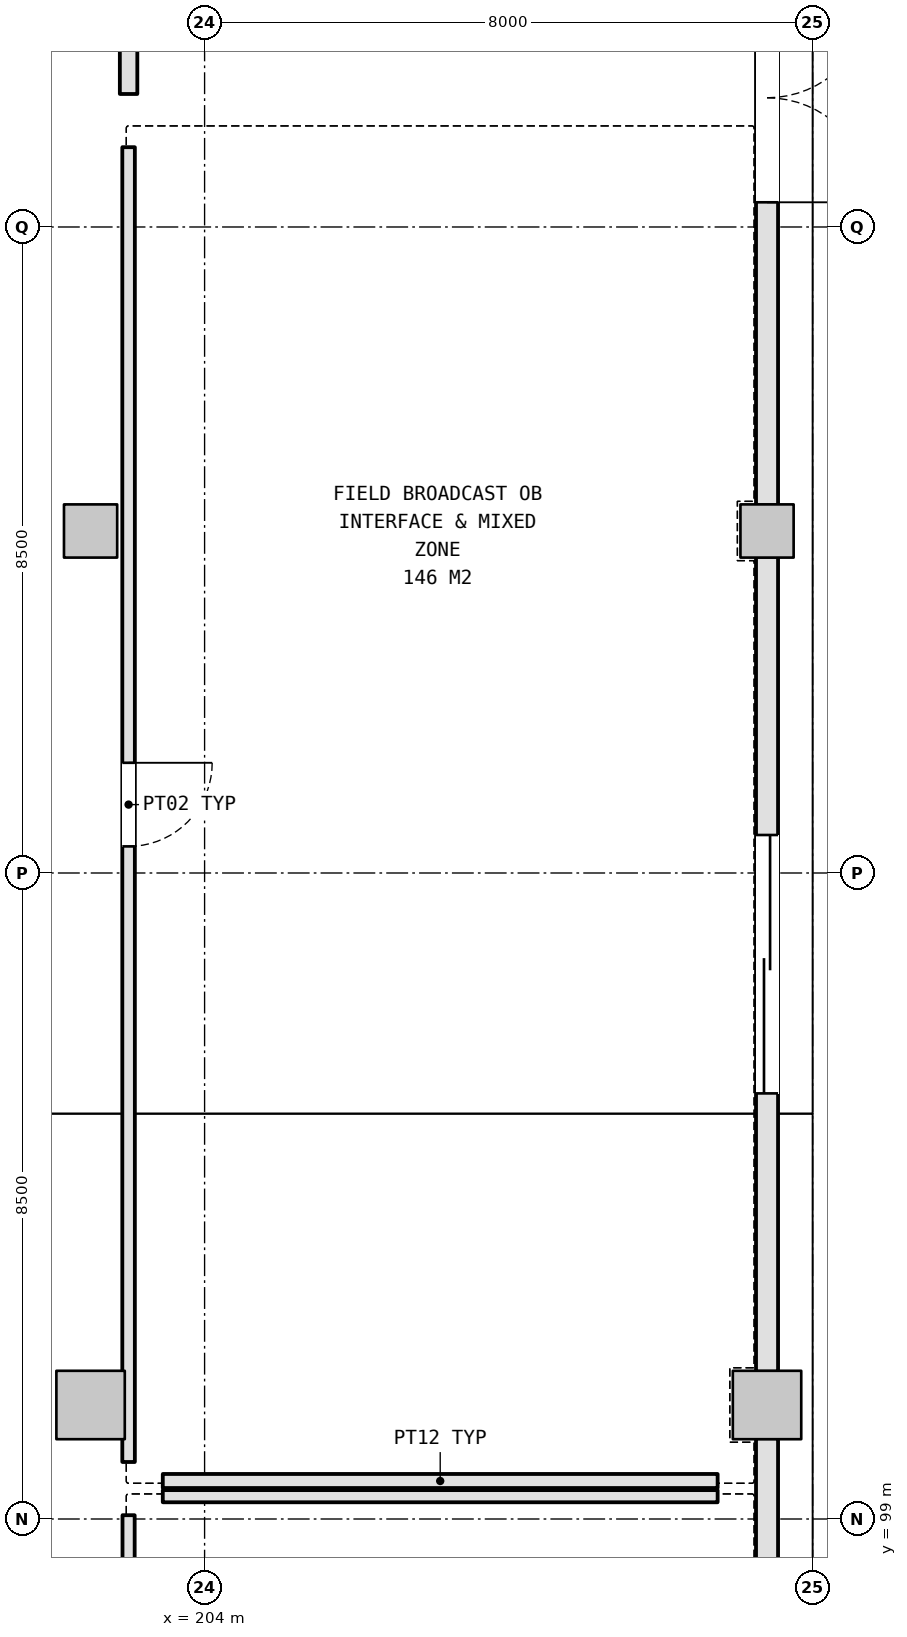
"""IFC4 building model, lengths in metres.
Left out: names, types, materials, properties, quantities, classifications, styles, units other than length and angle.
Written with IfcOpenShell. Run it as: python <this file> out.ifc"""

import sys

from ifc_helpers import new_model, si_unit, direction, frame, frame_2d, origin, origin_2d, place, context, subcontext, project, spatial, rectangle, extrude, element, fill, save


model = new_model("IFC4")
c1 = context("Model", 3, precision=1e-05, world=origin(), true_north=direction((0.0, 1.0)))
c2 = subcontext(c1, "Body", "Model", "MODEL_VIEW")
j1 = project(units=[si_unit("LENGTHUNIT", "METRE"), si_unit("PLANEANGLEUNIT", "RADIAN")], contexts=[c1])
p1 = place(None, origin())
s1 = spatial("IfcSite", under=j1, at=p1, CompositionType="ELEMENT")
p2 = place(p1, origin())
s2 = spatial("IfcBuilding", under=s1, at=p2, CompositionType="ELEMENT")
p3 = place(p2, origin())
s3 = spatial("IfcBuildingStorey", under=s2, at=p3, CompositionType="ELEMENT", Elevation=0.0)
p4 = place(p3, frame((202.5, 100.5, 0.0), z_axis=(0.0, 0.0, 1.0), x_axis=(1.0, 0.0, 0.0)))
e1 = element("IfcColumn", 1, at=p4, inside=s3, PredefinedType="COLUMN", context=c2, shape_type="SweptSolid", body=[
    extrude(rectangle(XDim=0.9, YDim=0.9, at=origin_2d()), origin(), (0.0, 0.0, 1.0), 5.4),
])
p5 = place(p3, frame((202.5, 112.0, 0.0), z_axis=(0.0, 0.0, 1.0), x_axis=(1.0, 0.0, 0.0)))
e2 = element("IfcColumn", 2, at=p5, inside=s3, PredefinedType="COLUMN", context=c2, shape_type="SweptSolid", body=[
    extrude(rectangle(XDim=0.7, YDim=0.7, at=origin_2d()), origin(), (0.0, 0.0, 1.0), 5.4),
])
p6 = place(p3, frame((211.4, 100.5, 0.0), z_axis=(0.0, 0.0, 1.0), x_axis=(1.0, 0.0, 0.0)))
e3 = element("IfcColumn", 3, at=p6, inside=s3, PredefinedType="COLUMN", context=c2, shape_type="SweptSolid", body=[
    extrude(rectangle(XDim=0.9, YDim=0.9, at=origin_2d()), origin(), (0.0, 0.0, 1.0), 5.4),
])
p7 = place(p3, frame((211.4, 112.0, 0.0), z_axis=(0.0, 0.0, 1.0), x_axis=(1.0, 0.0, 0.0)))
e4 = element("IfcColumn", 4, at=p7, inside=s3, PredefinedType="COLUMN", context=c2, shape_type="SweptSolid", body=[
    extrude(rectangle(XDim=0.7, YDim=0.7, at=origin_2d()), origin(), (0.0, 0.0, 1.0), 5.4),
])
p8 = place(p3, frame((211.4, 89.338, 0.0), z_axis=(0.0, 0.0, 1.0), x_axis=(0.0, 1.0, 0.0)))
e5 = element("IfcWall", 5, at=p8, inside=s3, PredefinedType="SOLIDWALL", context=c2, shape_type="SweptSolid", body=[
    extrude(rectangle(XDim=10.724, YDim=0.29, at=frame_2d((5.362, 0.0))), origin(), (0.0, 0.0, 1.0), 4.475),
])
p9 = place(p8, frame((4.062, 0.0, 0.0)))
e6 = element("IfcOpeningElement", 6, at=p9, cuts=e5, PredefinedType="OPENING", context=c2, shape_type="SweptSolid", body=[
    extrude(rectangle(XDim=2.6, YDim=2.4, at=frame_2d((1.3, 1.2))), frame((0.0, 0.155, 0.0), z_axis=(0.0, -1.0, 0.0), x_axis=(1.0, 0.0, 0.0)), (0.0, 0.0, 1.0), 0.31),
])
p10 = place(p3, frame((211.4, 100.938, 0.0), z_axis=(0.0, 0.0, 1.0), x_axis=(0.0, 1.0, 0.0)))
e7 = element("IfcWall", 7, at=p10, inside=s3, PredefinedType="SOLIDWALL", context=c2, shape_type="SweptSolid", body=[
    extrude(rectangle(XDim=10.724, YDim=0.29, at=frame_2d((5.362, 0.0))), origin(), (0.0, 0.0, 1.0), 4.475),
])
p11 = place(p10, frame((3.662, 0.0, 0.0)))
e8 = element("IfcOpeningElement", 8, at=p11, cuts=e7, PredefinedType="OPENING", context=c2, shape_type="SweptSolid", body=[
    extrude(rectangle(XDim=3.4, YDim=3.8, at=frame_2d((1.7, 1.9))), frame((0.0, 0.155, 0.0), z_axis=(0.0, -1.0, 0.0), x_axis=(1.0, 0.0, 0.0)), (0.0, 0.0, 1.0), 0.31),
])
p12 = place(p3, frame((211.4, 112.338, 0.0), z_axis=(0.0, 0.0, 1.0), x_axis=(0.0, 1.0, 0.0)))
e9 = element("IfcWall", 9, at=p12, inside=s3, PredefinedType="SOLIDWALL", context=c2, shape_type="SweptSolid", body=[
    extrude(rectangle(XDim=10.724, YDim=0.29, at=frame_2d((5.362, 0.0))), origin(), (0.0, 0.0, 1.0), 4.475),
])
p13 = place(p12, frame((3.987, 0.0, 0.0)))
e10 = element("IfcOpeningElement", 10, at=p13, cuts=e9, PredefinedType="OPENING", context=c2, shape_type="SweptSolid", body=[
    extrude(rectangle(XDim=2.75, YDim=2.4, at=frame_2d((1.375, 1.2))), frame((0.0, 0.155, 0.0), z_axis=(0.0, -1.0, 0.0), x_axis=(1.0, 0.0, 0.0)), (0.0, 0.0, 1.0), 0.31),
])
p14 = place(p3, frame((203.0, 71.75, 0.0), z_axis=(0.0, 0.0, 1.0), x_axis=(0.0, 1.0, 0.0)))
e11 = element("IfcWall", 11, at=p14, inside=s3, PredefinedType="PARTITIONING", context=c2, shape_type="SweptSolid", body=[
    extrude(rectangle(XDim=27.3, YDim=0.16, at=frame_2d((13.65, 0.0))), origin(), (0.0, 0.0, 1.0), 4.625),
])
p15 = place(p14, frame((13.075, 0.0, 0.0)))
e12 = element("IfcOpeningElement", 12, at=p15, cuts=e11, PredefinedType="OPENING", context=c2, shape_type="SweptSolid", body=[
    extrude(rectangle(XDim=1.15, YDim=2.2, at=frame_2d((0.575, 1.1))), frame((0.0, 0.09, 0.0), z_axis=(0.0, -1.0, 0.0), x_axis=(1.0, 0.0, 0.0)), (0.0, 0.0, 1.0), 0.18),
])
p16 = place(p3, frame((203.45, 99.3, 0.0), z_axis=(0.0, 0.0, 1.0), x_axis=(1.0, 0.0, 0.0)))
e13 = element("IfcWall", 13, at=p16, inside=s3, PredefinedType="PARTITIONING", context=c2, shape_type="SweptSolid", body=[
    extrude(rectangle(XDim=7.3, YDim=0.16, at=frame_2d((3.65, 0.0))), origin(), (0.0, 0.0, 1.0), 5.12),
])
p17 = place(p3, frame((203.0, 99.75, 0.0), z_axis=(0.0, 0.0, 1.0), x_axis=(0.0, 1.0, 0.0)))
e14 = element("IfcWall", 14, at=p17, inside=s3, PredefinedType="PARTITIONING", context=c2, shape_type="SweptSolid", body=[
    extrude(rectangle(XDim=17.3, YDim=0.165, at=frame_2d((8.65, 0.0))), origin(), (0.0, 0.0, 1.0), 4.625),
])
p18 = place(p17, frame((8.1, 0.0, 0.0)))
e15 = element("IfcOpeningElement", 15, at=p18, cuts=e14, PredefinedType="OPENING", context=c2, shape_type="SweptSolid", body=[
    extrude(rectangle(XDim=1.1, YDim=2.15, at=frame_2d((0.55, 1.075))), frame((0.0, 0.093, 0.0), z_axis=(0.0, -1.0, 0.0), x_axis=(1.0, 0.0, 0.0)), (0.0, 0.0, 1.0), 0.185),
])
p19 = place(p3, frame((210.75, 99.5, 0.0), z_axis=(0.0, 0.0, 1.0), x_axis=(-1.0, 0.0, 0.0)))
e16 = element("IfcWall", 16, at=p19, inside=s3, PredefinedType="PARTITIONING", context=c2, shape_type="SweptSolid", body=[
    extrude(rectangle(XDim=7.3, YDim=0.185, at=frame_2d((3.65, 0.0))), origin(), (0.0, 0.0, 1.0), 5.12),
])
p20 = place(p3, frame((203.0, 117.75, 0.0), z_axis=(0.0, 0.0, 1.0), x_axis=(0.0, 1.0, 0.0)))
e17 = element("IfcWall", 17, at=p20, inside=s3, PredefinedType="PLUMBINGWALL", context=c2, shape_type="SweptSolid", body=[
    extrude(rectangle(XDim=11.3, YDim=0.23, at=frame_2d((5.65, 0.0))), origin(), (0.0, 0.0, 1.0), 4.625),
])
p21 = place(p20, frame((3.96, 0.0, 0.0)))
e18 = element("IfcOpeningElement", 18, at=p21, cuts=e17, PredefinedType="OPENING", context=c2, shape_type="SweptSolid", body=[
    extrude(rectangle(XDim=0.98, YDim=2.15, at=frame_2d((0.49, 1.075))), frame((0.0, 0.125, 0.0), z_axis=(0.0, -1.0, 0.0), x_axis=(1.0, 0.0, 0.0)), (0.0, 0.0, 1.0), 0.25),
])
p22 = place(p11, frame((3.4, 0.0, 0.0), z_axis=(0.0, 0.0, 1.0), x_axis=(-1.0, 0.0, 0.0)))
e19 = element("IfcDoor", 19, at=p22, inside=s3, OperationType="ROLLINGUP", PredefinedType="DOOR", context=c2, shape_type="SweptSolid", body=[
    extrude(rectangle(XDim=3.4, YDim=3.8, at=frame_2d((1.7, 1.9))), frame((0.0, 0.025, 0.0), z_axis=(0.0, -1.0, 0.0), x_axis=(1.0, 0.0, 0.0)), (0.0, 0.0, 1.0), 0.05),
])
fill(e8, e19)
p23 = place(p13, frame((2.75, 0.0, 0.0), z_axis=(0.0, 0.0, 1.0), x_axis=(-1.0, 0.0, 0.0)))
e20 = element("IfcDoor", 20, at=p23, inside=s3, OperationType="DOUBLE_DOOR_SINGLE_SWING", PredefinedType="DOOR", context=c2, shape_type="SweptSolid", body=[
    extrude(rectangle(XDim=2.75, YDim=2.4, at=frame_2d((1.375, 1.2))), frame((0.0, 0.025, 0.0), z_axis=(0.0, -1.0, 0.0), x_axis=(1.0, 0.0, 0.0)), (0.0, 0.0, 1.0), 0.05),
])
fill(e10, e20)
p24 = place(p18, frame((1.1, 0.0, 0.0), z_axis=(0.0, 0.0, 1.0), x_axis=(-1.0, 0.0, 0.0)))
e21 = element("IfcDoor", 21, at=p24, inside=s3, OperationType="SINGLE_SWING_RIGHT", PredefinedType="DOOR", context=c2, shape_type="SweptSolid", body=[
    extrude(rectangle(XDim=1.1, YDim=2.15, at=frame_2d((0.55, 1.075))), frame((0.0, 0.025, 0.0), z_axis=(0.0, -1.0, 0.0), x_axis=(1.0, 0.0, 0.0)), (0.0, 0.0, 1.0), 0.05),
])
fill(e15, e21)
save(model, sys.argv[1])
